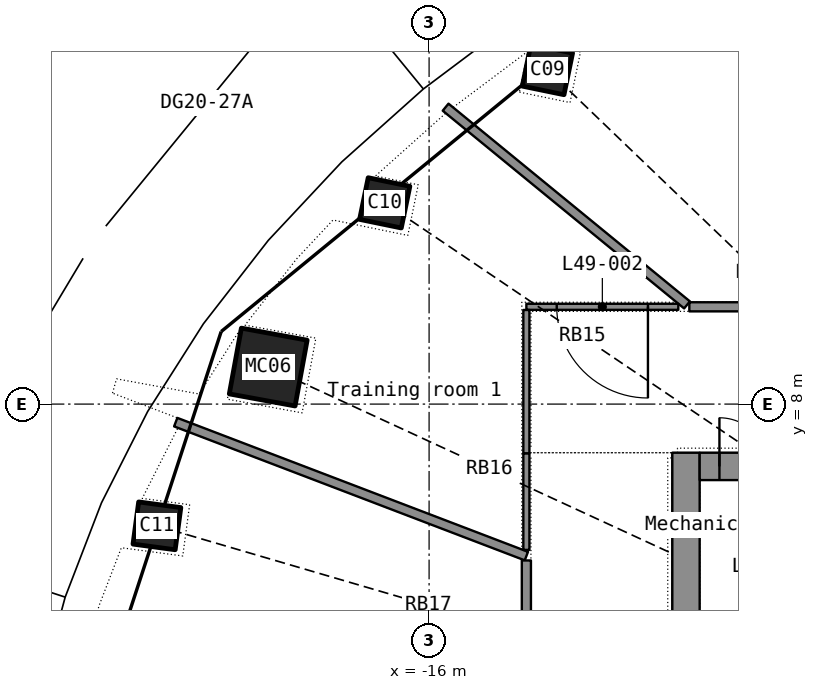
"""IFC4 building model, lengths in metres.
Left out: names, types, materials, properties, quantities, classifications, styles, units other than length and angle.
Written with IfcOpenShell. Run it as: python <this file> out.ifc"""

import sys

from ifc_helpers import new_model, si_unit, direction, frame, frame_2d, origin, origin_2d, place, context, subcontext, project, spatial, rectangle, hollow_rectangle, extrude, element, fill, save


model = new_model("IFC4")
c1 = context("Model", 3, precision=1e-05, world=origin(), true_north=direction((0.0, 1.0)))
c2 = subcontext(c1, "Body", "Model", "MODEL_VIEW")
j1 = project(units=[si_unit("LENGTHUNIT", "METRE"), si_unit("PLANEANGLEUNIT", "RADIAN")], contexts=[c1])
p1 = place(None, origin())
s1 = spatial("IfcSite", under=j1, at=p1, CompositionType="ELEMENT")
p2 = place(p1, origin())
s2 = spatial("IfcBuilding", under=s1, at=p2, CompositionType="ELEMENT")
p3 = place(p2, frame((0.0, 0.0, 201.5)))
s3 = spatial("IfcBuildingStorey", under=s2, at=p3, CompositionType="ELEMENT", Elevation=201.5)
p4 = place(p3, frame((-14.053, 13.502, 0.0), z_axis=(0.022226156, -0.021698532, 0.999517469), x_axis=(0.828555744, 0.559871471, -0.006270246)))
e1 = element("IfcColumn", 1, at=p4, inside=s3, PredefinedType="COLUMN", context=c2, shape_type="SweptSolid", body=[
    extrude(hollow_rectangle(XDim=0.7, YDim=0.7, WallThickness=0.025, at=origin_2d()), origin(), (0.0, 0.0, 1.0), 3.702),
])
p5 = place(p3, frame((-16.729, 11.31, 0.0), z_axis=(0.026512179, -0.018202391, 0.999482755), x_axis=(0.720491942, 0.693433005, -0.006483025)))
e2 = element("IfcColumn", 2, at=p5, inside=s3, PredefinedType="COLUMN", context=c2, shape_type="SweptSolid", body=[
    extrude(hollow_rectangle(XDim=0.7, YDim=0.7, WallThickness=0.025, at=origin_2d()), origin(), (0.0, 0.0, 1.0), 3.702),
])
p6 = place(p3, frame((-18.646, 8.609, 0.0), z_axis=(0.029940695, -0.014113015, 0.999452039), x_axis=(0.582481605, 0.812821947, -0.005971808)))
e3 = element("IfcColumn", 3, at=p6, inside=s3, PredefinedType="COLUMN", context=c2, shape_type="SweptSolid", body=[
    extrude(hollow_rectangle(XDim=1.1, YDim=1.1, WallThickness=0.032, at=origin_2d()), origin(), (0.0, 0.0, 1.0), 3.702),
])
p7 = place(p3, frame((-20.476, 5.998, 0.0), z_axis=(0.032511791, -0.009694185, 0.999424337), x_axis=(0.410410626, 0.911889695, -0.004505751)))
e4 = element("IfcColumn", 4, at=p7, inside=s3, PredefinedType="COLUMN", context=c2, shape_type="SweptSolid", body=[
    extrude(hollow_rectangle(XDim=0.7, YDim=0.7, WallThickness=0.025, at=origin_2d()), origin(), (0.0, 0.0, 1.0), 3.702),
])
p8 = place(p3, frame((-11.775, -7.2, 0.0), z_axis=(0.0, 0.0, 1.0), x_axis=(0.0, 1.0, 0.0)))
e5 = element("IfcWall", 5, at=p8, inside=s3, PredefinedType="SHEAR", context=c2, shape_type="SweptSolid", body=[
    extrude(rectangle(XDim=14.4, YDim=0.45, at=frame_2d((7.2, 0.0))), origin(), (0.0, 0.0, 1.0), 3.3),
])
p9 = place(p8, frame((6.5, 0.0, 0.0)))
e6 = element("IfcOpeningElement", 6, at=p9, cuts=e5, PredefinedType="OPENING", context=c2, shape_type="SweptSolid", body=[
    extrude(rectangle(XDim=1.4, YDim=2.2, at=frame_2d((0.7, 1.1))), frame((0.0, 0.235, 0.0), z_axis=(0.0, -1.0, 0.0), x_axis=(1.0, 0.0, 0.0)), (0.0, 0.0, 1.0), 0.47),
])
p10 = place(p3, frame((-11.55, 6.975, 0.0), z_axis=(0.0, 0.0, 1.0), x_axis=(1.0, 0.0, 0.0)))
e7 = element("IfcWall", 7, at=p10, inside=s3, PredefinedType="SHEAR", context=c2, shape_type="SweptSolid", body=[
    extrude(rectangle(XDim=23.1, YDim=0.45, at=frame_2d((11.55, 0.0))), origin(), (0.0, 0.0, 1.0), 3.3),
])
p11 = place(p10, frame((2.0, 0.0, 0.0)))
e8 = element("IfcOpeningElement", 8, at=p11, cuts=e7, PredefinedType="OPENING", context=c2, shape_type="SweptSolid", body=[
    extrude(rectangle(XDim=1.1, YDim=2.2, at=frame_2d((0.55, 1.1))), frame((0.0, 0.235, 0.0), z_axis=(0.0, -1.0, 0.0), x_axis=(1.0, 0.0, 0.0)), (0.0, 0.0, 1.0), 0.47),
])
p12 = place(p10, frame((6.0, 0.0, 0.0)))
e9 = element("IfcOpeningElement", 9, at=p12, cuts=e7, PredefinedType="OPENING", context=c2, shape_type="SweptSolid", body=[
    extrude(rectangle(XDim=1.1, YDim=2.2, at=frame_2d((0.55, 1.1))), frame((0.0, 0.235, 0.0), z_axis=(0.0, -1.0, 0.0), x_axis=(1.0, 0.0, 0.0)), (0.0, 0.0, 1.0), 0.47),
])
p13 = place(p10, frame((8.0, 0.0, 0.0)))
e10 = element("IfcOpeningElement", 10, at=p13, cuts=e7, PredefinedType="OPENING", context=c2, shape_type="SweptSolid", body=[
    extrude(rectangle(XDim=1.1, YDim=2.2, at=frame_2d((0.55, 1.1))), frame((0.0, 0.235, 0.0), z_axis=(0.0, -1.0, 0.0), x_axis=(1.0, 0.0, 0.0)), (0.0, 0.0, 1.0), 0.47),
])
p14 = place(p10, frame((10.0, 0.0, 0.0)))
e11 = element("IfcOpeningElement", 11, at=p14, cuts=e7, PredefinedType="OPENING", context=c2, shape_type="SweptSolid", body=[
    extrude(rectangle(XDim=1.1, YDim=2.2, at=frame_2d((0.55, 1.1))), frame((0.0, 0.235, 0.0), z_axis=(0.0, -1.0, 0.0), x_axis=(1.0, 0.0, 0.0)), (0.0, 0.0, 1.0), 0.47),
])
p15 = place(p10, frame((12.0, 0.0, 0.0)))
e12 = element("IfcOpeningElement", 12, at=p15, cuts=e7, PredefinedType="OPENING", context=c2, shape_type="SweptSolid", body=[
    extrude(rectangle(XDim=1.1, YDim=2.2, at=frame_2d((0.55, 1.1))), frame((0.0, 0.235, 0.0), z_axis=(0.0, -1.0, 0.0), x_axis=(1.0, 0.0, 0.0)), (0.0, 0.0, 1.0), 0.47),
])
p16 = place(p10, frame((14.0, 0.0, 0.0)))
e13 = element("IfcOpeningElement", 13, at=p16, cuts=e7, PredefinedType="OPENING", context=c2, shape_type="SweptSolid", body=[
    extrude(rectangle(XDim=1.1, YDim=2.2, at=frame_2d((0.55, 1.1))), frame((0.0, 0.235, 0.0), z_axis=(0.0, -1.0, 0.0), x_axis=(1.0, 0.0, 0.0)), (0.0, 0.0, 1.0), 0.47),
])
p17 = place(p10, frame((16.0, 0.0, 0.0)))
e14 = element("IfcOpeningElement", 14, at=p17, cuts=e7, PredefinedType="OPENING", context=c2, shape_type="SweptSolid", body=[
    extrude(rectangle(XDim=1.1, YDim=2.2, at=frame_2d((0.55, 1.1))), frame((0.0, 0.235, 0.0), z_axis=(0.0, -1.0, 0.0), x_axis=(1.0, 0.0, 0.0)), (0.0, 0.0, 1.0), 0.47),
])
p18 = place(p10, frame((18.0, 0.0, 0.0)))
e15 = element("IfcOpeningElement", 15, at=p18, cuts=e7, PredefinedType="OPENING", context=c2, shape_type="SweptSolid", body=[
    extrude(rectangle(XDim=1.1, YDim=2.2, at=frame_2d((0.55, 1.1))), frame((0.0, 0.235, 0.0), z_axis=(0.0, -1.0, 0.0), x_axis=(1.0, 0.0, 0.0)), (0.0, 0.0, 1.0), 0.47),
])
p19 = place(p10, frame((20.0, 0.0, 0.0)))
e16 = element("IfcOpeningElement", 16, at=p19, cuts=e7, PredefinedType="OPENING", context=c2, shape_type="SweptSolid", body=[
    extrude(rectangle(XDim=1.1, YDim=2.2, at=frame_2d((0.55, 1.1))), frame((0.0, 0.235, 0.0), z_axis=(0.0, -1.0, 0.0), x_axis=(1.0, 0.0, 0.0)), (0.0, 0.0, 1.0), 0.47),
])
p20 = place(p10, frame((4.1, 0.0, 0.0)))
e17 = element("IfcOpeningElement", 17, at=p20, cuts=e7, PredefinedType="OPENING", context=c2, shape_type="SweptSolid", body=[
    extrude(rectangle(XDim=0.9, YDim=2.1, at=frame_2d((0.45, 1.05))), frame((0.0, 0.235, 0.0), z_axis=(0.0, -1.0, 0.0), x_axis=(1.0, 0.0, 0.0)), (0.0, 0.0, 1.0), 0.47),
])
p21 = place(p10, frame((0.325, 0.0, 0.0)))
e18 = element("IfcOpeningElement", 18, at=p21, cuts=e7, PredefinedType="OPENING", context=c2, shape_type="SweptSolid", body=[
    extrude(rectangle(XDim=0.8, YDim=2.05, at=frame_2d((0.4, 1.025))), frame((0.0, 0.235, 0.0), z_axis=(0.0, -1.0, 0.0), x_axis=(1.0, 0.0, 0.0)), (0.0, 0.0, 1.0), 0.47),
])
p22 = place(p10, frame((21.975, 0.0, 0.0)))
e19 = element("IfcOpeningElement", 19, at=p22, cuts=e7, PredefinedType="OPENING", context=c2, shape_type="SweptSolid", body=[
    extrude(rectangle(XDim=0.8, YDim=2.05, at=frame_2d((0.4, 1.025))), frame((0.0, 0.235, 0.0), z_axis=(0.0, -1.0, 0.0), x_axis=(1.0, 0.0, 0.0)), (0.0, 0.0, 1.0), 0.47),
])
p23 = place(p3, frame((-3.14, 9.6, 0.0), z_axis=(0.0, 0.0, 1.0), x_axis=(-1.0, 0.0, 0.0)))
e20 = element("IfcWall", 20, at=p23, inside=s3, PredefinedType="PARTITIONING", context=c2, shape_type="SweptSolid", body=[
    extrude(rectangle(XDim=8.58, YDim=0.15, at=frame_2d((4.29, 0.0))), origin(), (0.0, 0.0, 1.0), 2.4),
])
p24 = place(p23, frame((3.69, 0.0, 0.0)))
e21 = element("IfcOpeningElement", 21, at=p24, cuts=e20, PredefinedType="OPENING", context=c2, shape_type="SweptSolid", body=[
    extrude(rectangle(XDim=1.2, YDim=2.2, at=frame_2d((0.6, 1.1))), frame((0.0, 0.085, 0.0), z_axis=(0.0, -1.0, 0.0), x_axis=(1.0, 0.0, 0.0)), (0.0, 0.0, 1.0), 0.17),
])
p25 = place(p3, frame((-20.167, 7.703, 0.0), z_axis=(0.0, 0.0, 1.0), x_axis=(0.934182919, -0.356794441, 0.0)))
e22 = element("IfcWall", 22, at=p25, inside=s3, PredefinedType="PARTITIONING", context=c2, shape_type="SweptSolid", body=[
    extrude(rectangle(XDim=6.173, YDim=0.15, at=frame_2d((3.087, 0.0))), origin(), (0.0, 0.0, 1.0), 2.4),
])
p26 = place(p3, frame((-15.729, 12.883, 0.0), z_axis=(0.0, 0.0, 1.0), x_axis=(0.77361382, -0.633657366, 0.0)))
e23 = element("IfcWall", 23, at=p26, inside=s3, PredefinedType="PARTITIONING", context=c2, shape_type="SweptSolid", body=[
    extrude(rectangle(XDim=5.132, YDim=0.15, at=frame_2d((2.566, 0.0))), origin(), (0.0, 0.0, 1.0), 2.4),
])
p27 = place(p3, frame((-14.4, 5.428, 0.0), z_axis=(0.0, 0.0, 1.0), x_axis=(0.0, -1.0, 0.0)))
e24 = element("IfcWall", 24, at=p27, inside=s3, PredefinedType="PARTITIONING", context=c2, shape_type="SweptSolid", body=[
    extrude(rectangle(XDim=3.851, YDim=0.15, at=frame_2d((1.926, 0.0))), origin(), (0.0, 0.0, 1.0), 2.4),
])
p28 = place(p3, frame((-11.901, 9.6, 0.0), z_axis=(0.0, 0.0, 1.0), x_axis=(-1.0, 0.0, 0.0)))
e25 = element("IfcWall", 25, at=p28, inside=s3, PredefinedType="PARTITIONING", context=c2, shape_type="SweptSolid", body=[
    extrude(rectangle(XDim=2.499, YDim=0.1, at=frame_2d((1.249, 0.0))), origin(), (0.0, 0.0, 1.0), 2.4),
])
p29 = place(p28, frame((0.499, 0.0, 0.0)))
e26 = element("IfcOpeningElement", 26, at=p29, cuts=e25, PredefinedType="OPENING", context=c2, shape_type="SweptSolid", body=[
    extrude(rectangle(XDim=1.5, YDim=2.4, at=frame_2d((0.75, 1.2))), frame((0.0, 0.06, 0.0), z_axis=(0.0, -1.0, 0.0), x_axis=(1.0, 0.0, 0.0)), (0.0, 0.0, 1.0), 0.12),
])
p30 = place(p3, frame((-14.4, 9.548, 0.0), z_axis=(0.0, 0.0, 1.0), x_axis=(0.0, -1.0, 0.0)))
e27 = element("IfcWall", 27, at=p30, inside=s3, PredefinedType="PARTITIONING", context=c2, shape_type="SweptSolid", body=[
    extrude(rectangle(XDim=2.36, YDim=0.1, at=frame_2d((1.18, 0.0))), origin(), (0.0, 0.0, 1.0), 2.4),
])
p31 = place(p3, frame((-14.4, 7.187, 0.0), z_axis=(0.0, 0.0, 1.0), x_axis=(0.0, -1.0, 0.0)))
e28 = element("IfcWall", 28, at=p31, inside=s3, PredefinedType="PARTITIONING", context=c2, shape_type="SweptSolid", body=[
    extrude(rectangle(XDim=1.585, YDim=0.1, at=frame_2d((0.793, 0.0))), origin(), (0.0, 0.0, 1.0), 2.4),
])
p32 = place(p21, origin())
e29 = element("IfcDoor", 29, at=p32, inside=s3, OperationType="SINGLE_SWING_LEFT", PredefinedType="DOOR", context=c2, shape_type="SweptSolid", body=[
    extrude(rectangle(XDim=0.8, YDim=2.05, at=frame_2d((0.4, 1.025))), frame((0.0, 0.025, 0.0), z_axis=(0.0, -1.0, 0.0), x_axis=(1.0, 0.0, 0.0)), (0.0, 0.0, 1.0), 0.05),
])
fill(e18, e29)
p33 = place(p29, origin())
e30 = element("IfcDoor", 30, at=p33, inside=s3, OperationType="DOUBLE_DOOR_SINGLE_SWING", PredefinedType="DOOR", context=c2, shape_type="SweptSolid", body=[
    extrude(rectangle(XDim=1.5, YDim=2.4, at=frame_2d((0.75, 1.2))), frame((0.0, 0.025, 0.0), z_axis=(0.0, -1.0, 0.0), x_axis=(1.0, 0.0, 0.0)), (0.0, 0.0, 1.0), 0.05),
])
fill(e26, e30)
save(model, sys.argv[1])
